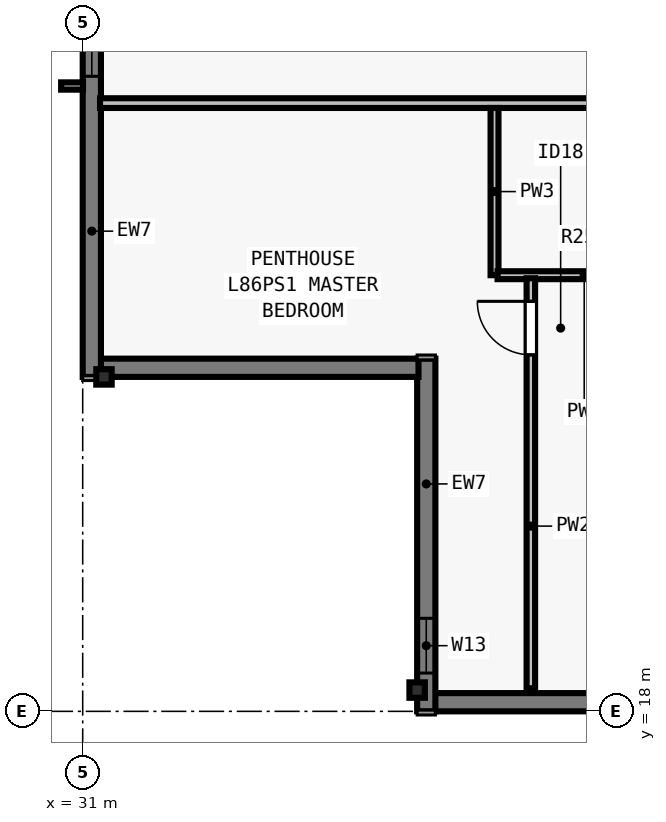
"""IFC4 building model, lengths in metres.
Left out: names, types, materials, properties, quantities, classifications, styles, units other than length and angle.
Written with IfcOpenShell. Run it as: python <this file> out.ifc"""

import sys

from ifc_helpers import new_model, si_unit, direction, frame, frame_2d, origin, origin_2d, place, context, subcontext, project, spatial, rectangle, i_section, extrude, element, fill, save


model = new_model("IFC4")
c1 = context("Model", 3, precision=1e-05, world=origin(), true_north=direction((0.0, 1.0)))
c2 = subcontext(c1, "Body", "Model", "MODEL_VIEW")
j1 = project(units=[si_unit("LENGTHUNIT", "METRE"), si_unit("PLANEANGLEUNIT", "RADIAN")], contexts=[c1])
p1 = place(None, origin())
s1 = spatial("IfcSite", under=j1, at=p1, CompositionType="ELEMENT")
p2 = place(p1, origin())
s2 = spatial("IfcBuilding", under=s1, at=p2, CompositionType="ELEMENT")
p3 = place(p2, frame((0.0, 0.0, 312.0)))
s3 = spatial("IfcBuildingStorey", under=s2, at=p3, CompositionType="ELEMENT", Elevation=312.0)
for number, where, z_axis, x_axis in (
    (1, (36.5, 18.35, 0.0), (0.0, 0.0, 1.0), (1.0, 0.0, 0.0)),
    (2, (31.35, 23.5, 0.0), (0.0, 0.0, 1.0), (0.0, 1.0, 0.0)),
):
    element("IfcColumn", number, at=place(p3, frame(where, z_axis=z_axis, x_axis=x_axis)), inside=s3, PredefinedType="COLUMN", context=c2, shape_type="SweptSolid", body=[
        extrude(i_section(OverallWidth=0.254, OverallDepth=0.254, WebThickness=0.009, FlangeThickness=0.014, FilletRadius=0.013, at=origin_2d()), origin(), (0.0, 0.0, 1.0), 3.5),
    ])
p4 = place(p3, frame((67.5, 18.15, 0.0), z_axis=(0.0, 0.0, 1.0), x_axis=(-1.0, 0.0, 0.0)))
e3 = element("IfcWall", 3, at=p4, inside=s3, PredefinedType="SOLIDWALL", context=c2, shape_type="SweptSolid", body=[
    extrude(rectangle(XDim=30.722, YDim=0.3, at=frame_2d((15.361, 0.0))), origin(), (0.0, 0.0, 1.0), 3.29),
])
p5 = place(p4, frame((4.944, 0.0, 0.8)))
e4 = element("IfcOpeningElement", 4, at=p5, cuts=e3, PredefinedType="OPENING", context=c2, shape_type="SweptSolid", body=[
    extrude(rectangle(XDim=1.65, YDim=1.758, at=frame_2d((0.825, 0.879))), frame((0.0, 0.16, 0.0), z_axis=(0.0, -1.0, 0.0), x_axis=(1.0, 0.0, 0.0)), (0.0, 0.0, 1.0), 0.32),
])
p6 = place(p4, frame((7.756, 0.0, 0.8)))
e5 = element("IfcOpeningElement", 5, at=p6, cuts=e3, PredefinedType="OPENING", context=c2, shape_type="SweptSolid", body=[
    extrude(rectangle(XDim=2.0, YDim=1.758, at=frame_2d((1.0, 0.879))), frame((0.0, 0.16, 0.0), z_axis=(0.0, -1.0, 0.0), x_axis=(1.0, 0.0, 0.0)), (0.0, 0.0, 1.0), 0.32),
])
p7 = place(p4, frame((12.617, 0.0, 0.8)))
e6 = element("IfcOpeningElement", 6, at=p7, cuts=e3, PredefinedType="OPENING", context=c2, shape_type="SweptSolid", body=[
    extrude(rectangle(XDim=1.65, YDim=1.758, at=frame_2d((0.825, 0.879))), frame((0.0, 0.16, 0.0), z_axis=(0.0, -1.0, 0.0), x_axis=(1.0, 0.0, 0.0)), (0.0, 0.0, 1.0), 0.32),
])
p8 = place(p4, frame((16.28, 0.0, 0.8)))
e7 = element("IfcOpeningElement", 7, at=p8, cuts=e3, PredefinedType="OPENING", context=c2, shape_type="SweptSolid", body=[
    extrude(rectangle(XDim=2.0, YDim=1.758, at=frame_2d((1.0, 0.879))), frame((0.0, 0.16, 0.0), z_axis=(0.0, -1.0, 0.0), x_axis=(1.0, 0.0, 0.0)), (0.0, 0.0, 1.0), 0.32),
])
p9 = place(p4, frame((21.142, 0.0, 0.8)))
e8 = element("IfcOpeningElement", 8, at=p9, cuts=e3, PredefinedType="OPENING", context=c2, shape_type="SweptSolid", body=[
    extrude(rectangle(XDim=1.65, YDim=1.758, at=frame_2d((0.825, 0.879))), frame((0.0, 0.16, 0.0), z_axis=(0.0, -1.0, 0.0), x_axis=(1.0, 0.0, 0.0)), (0.0, 0.0, 1.0), 0.32),
])
p10 = place(p4, frame((23.954, 0.0, 0.8)))
e9 = element("IfcOpeningElement", 9, at=p10, cuts=e3, PredefinedType="OPENING", context=c2, shape_type="SweptSolid", body=[
    extrude(rectangle(XDim=2.0, YDim=1.758, at=frame_2d((1.0, 0.879))), frame((0.0, 0.16, 0.0), z_axis=(0.0, -1.0, 0.0), x_axis=(1.0, 0.0, 0.0)), (0.0, 0.0, 1.0), 0.32),
])
p11 = place(p3, frame((36.65, 18.0, 0.0), z_axis=(0.0, 0.0, 1.0), x_axis=(0.0, 1.0, 0.0)))
e10 = element("IfcWall", 10, at=p11, inside=s3, PredefinedType="SOLIDWALL", context=c2, shape_type="SweptSolid", body=[
    extrude(rectangle(XDim=5.8, YDim=0.3, at=frame_2d((2.9, 0.0))), origin(), (0.0, 0.0, 1.0), 3.29),
])
p12 = place(p11, frame((0.63, 0.0, 0.8)))
e11 = element("IfcOpeningElement", 11, at=p12, cuts=e10, PredefinedType="OPENING", context=c2, shape_type="SweptSolid", body=[
    extrude(rectangle(XDim=0.9, YDim=1.75, at=frame_2d((0.45, 0.875))), frame((0.0, 0.16, 0.0), z_axis=(0.0, -1.0, 0.0), x_axis=(1.0, 0.0, 0.0)), (0.0, 0.0, 1.0), 0.32),
])
p13 = place(p3, frame((36.522, 23.65, 0.0), z_axis=(0.0, 0.0, 1.0), x_axis=(-1.0, 0.0, 0.0)))
e12 = element("IfcWall", 12, at=p13, inside=s3, PredefinedType="SOLIDWALL", context=c2, shape_type="SweptSolid", body=[
    extrude(rectangle(XDim=5.244, YDim=0.3, at=frame_2d((2.622, 0.0))), origin(), (0.0, 0.0, 1.0), 3.29),
])
p14 = place(p3, frame((31.15, 23.5, 0.0), z_axis=(0.0, 0.0, 1.0), x_axis=(0.0, 1.0, 0.0)))
e13 = element("IfcWall", 13, at=p14, inside=s3, PredefinedType="SOLIDWALL", context=c2, shape_type="SweptSolid", body=[
    extrude(rectangle(XDim=30.722, YDim=0.3, at=frame_2d((15.361, 0.0))), origin(), (0.0, 0.0, 1.0), 3.29),
])
p15 = place(p14, frame((4.944, 0.0, 0.8)))
e14 = element("IfcOpeningElement", 14, at=p15, cuts=e13, PredefinedType="OPENING", context=c2, shape_type="SweptSolid", body=[
    extrude(rectangle(XDim=1.65, YDim=1.758, at=frame_2d((0.825, 0.879))), frame((0.0, 0.16, 0.0), z_axis=(0.0, -1.0, 0.0), x_axis=(1.0, 0.0, 0.0)), (0.0, 0.0, 1.0), 0.32),
])
p16 = place(p14, frame((7.756, 0.0, 0.8)))
e15 = element("IfcOpeningElement", 15, at=p16, cuts=e13, PredefinedType="OPENING", context=c2, shape_type="SweptSolid", body=[
    extrude(rectangle(XDim=2.0, YDim=1.758, at=frame_2d((1.0, 0.879))), frame((0.0, 0.16, 0.0), z_axis=(0.0, -1.0, 0.0), x_axis=(1.0, 0.0, 0.0)), (0.0, 0.0, 1.0), 0.32),
])
p17 = place(p14, frame((12.617, 0.0, 0.8)))
e16 = element("IfcOpeningElement", 16, at=p17, cuts=e13, PredefinedType="OPENING", context=c2, shape_type="SweptSolid", body=[
    extrude(rectangle(XDim=1.65, YDim=1.758, at=frame_2d((0.825, 0.879))), frame((0.0, 0.16, 0.0), z_axis=(0.0, -1.0, 0.0), x_axis=(1.0, 0.0, 0.0)), (0.0, 0.0, 1.0), 0.32),
])
p18 = place(p14, frame((17.53, 0.0, 0.8)))
e17 = element("IfcOpeningElement", 17, at=p18, cuts=e13, PredefinedType="OPENING", context=c2, shape_type="SweptSolid", body=[
    extrude(rectangle(XDim=2.0, YDim=1.758, at=frame_2d((1.0, 0.879))), frame((0.0, 0.16, 0.0), z_axis=(0.0, -1.0, 0.0), x_axis=(1.0, 0.0, 0.0)), (0.0, 0.0, 1.0), 0.32),
])
p19 = place(p14, frame((21.142, 0.0, 0.8)))
e18 = element("IfcOpeningElement", 18, at=p19, cuts=e13, PredefinedType="OPENING", context=c2, shape_type="SweptSolid", body=[
    extrude(rectangle(XDim=1.65, YDim=1.758, at=frame_2d((0.825, 0.879))), frame((0.0, 0.16, 0.0), z_axis=(0.0, -1.0, 0.0), x_axis=(1.0, 0.0, 0.0)), (0.0, 0.0, 1.0), 0.32),
])
p20 = place(p14, frame((26.87, 0.0, 0.8)))
e19 = element("IfcOpeningElement", 19, at=p20, cuts=e13, PredefinedType="OPENING", context=c2, shape_type="SweptSolid", body=[
    extrude(rectangle(XDim=0.9, YDim=1.75, at=frame_2d((0.45, 0.875))), frame((0.0, 0.16, 0.0), z_axis=(0.0, -1.0, 0.0), x_axis=(1.0, 0.0, 0.0)), (0.0, 0.0, 1.0), 0.32),
])
p21 = place(p3, frame((31.285, 28.002, 0.0), z_axis=(0.0, 0.0, 1.0), x_axis=(1.0, 0.0, 0.0)))
e20 = element("IfcWall", 20, at=p21, inside=s3, PredefinedType="PARTITIONING", context=c2, shape_type="SweptSolid", body=[
    extrude(rectangle(XDim=41.43, YDim=0.16, at=frame_2d((20.715, 0.0))), origin(), (0.0, 0.0, 1.0), 3.009),
])
p22 = place(p21, frame((10.107, 0.0, 0.0)))
e21 = element("IfcOpeningElement", 21, at=p22, cuts=e20, PredefinedType="OPENING", context=c2, shape_type="SweptSolid", body=[
    extrude(rectangle(XDim=0.96, YDim=2.18, at=frame_2d((0.48, 1.09))), frame((0.0, 0.09, 0.0), z_axis=(0.0, -1.0, 0.0), x_axis=(1.0, 0.0, 0.0)), (0.0, 0.0, 1.0), 0.18),
])
p23 = place(p21, frame((30.688, 0.0, 0.0)))
e22 = element("IfcOpeningElement", 22, at=p23, cuts=e20, PredefinedType="OPENING", context=c2, shape_type="SweptSolid", body=[
    extrude(rectangle(XDim=0.96, YDim=2.18, at=frame_2d((0.48, 1.09))), frame((0.0, 0.09, 0.0), z_axis=(0.0, -1.0, 0.0), x_axis=(1.0, 0.0, 0.0)), (0.0, 0.0, 1.0), 0.18),
])
p24 = place(p3, frame((37.772, 25.173, 0.0), z_axis=(0.0, 0.0, 1.0), x_axis=(0.0, 1.0, 0.0)))
e23 = element("IfcWall", 23, at=p24, inside=s3, PredefinedType="PLUMBINGWALL", context=c2, shape_type="SweptSolid", body=[
    extrude(rectangle(XDim=2.75, YDim=0.13, at=frame_2d((1.375, 0.0))), origin(), (0.0, 0.0, 1.0), 3.29),
])
p25 = place(p3, frame((37.823, 25.173, 0.0), z_axis=(0.0, 0.0, 1.0), x_axis=(1.0, 0.0, 0.0)))
e24 = element("IfcWall", 24, at=p25, inside=s3, PredefinedType="PLUMBINGWALL", context=c2, shape_type="SweptSolid", body=[
    extrude(rectangle(XDim=2.85, YDim=0.13, at=frame_2d((1.425, 0.0))), origin(), (0.0, 0.0, 1.0), 3.29),
])
p26 = place(p3, frame((38.37, 18.38, 0.0), z_axis=(0.0, 0.0, 1.0), x_axis=(0.0, 1.0, 0.0)))
e25 = element("IfcWall", 25, at=p26, inside=s3, PredefinedType="PARTITIONING", context=c2, shape_type="SweptSolid", body=[
    extrude(rectangle(XDim=6.743, YDim=0.14, at=frame_2d((3.371, 0.0))), origin(), (0.0, 0.0, 1.0), 2.653),
])
p27 = place(p26, frame((5.482, 0.0, 0.0)))
e26 = element("IfcOpeningElement", 26, at=p27, cuts=e25, PredefinedType="OPENING", context=c2, shape_type="SweptSolid", body=[
    extrude(rectangle(XDim=0.88, YDim=2.1, at=frame_2d((0.44, 1.05))), frame((0.0, 0.08, 0.0), z_axis=(0.0, -1.0, 0.0), x_axis=(1.0, 0.0, 0.0)), (0.0, 0.0, 1.0), 0.16),
])
p28 = place(p15, origin())
e27 = element("IfcWindow", 27, at=p28, inside=s3, PartitioningType="SINGLE_PANEL", PredefinedType="WINDOW", context=c2, shape_type="SweptSolid", body=[
    extrude(rectangle(XDim=1.65, YDim=1.758, at=frame_2d((0.825, 0.879))), frame((0.0, -0.05, 0.0), z_axis=(0.0, -1.0, 0.0), x_axis=(1.0, 0.0, 0.0)), (0.0, 0.0, 1.0), 0.06),
])
fill(e14, e27)
p29 = place(p12, origin())
e28 = element("IfcWindow", 28, at=p29, inside=s3, PartitioningType="SINGLE_PANEL", PredefinedType="WINDOW", context=c2, shape_type="SweptSolid", body=[
    extrude(rectangle(XDim=0.9, YDim=1.75, at=frame_2d((0.45, 0.875))), frame((0.0, -0.04, 0.0), z_axis=(0.0, -1.0, 0.0), x_axis=(1.0, 0.0, 0.0)), (0.0, 0.0, 1.0), 0.06),
])
fill(e11, e28)
p30 = place(p27, origin())
e29 = element("IfcDoor", 29, at=p30, inside=s3, OperationType="SINGLE_SWING_RIGHT", PredefinedType="DOOR", context=c2, shape_type="SweptSolid", body=[
    extrude(rectangle(XDim=0.88, YDim=2.1, at=frame_2d((0.44, 1.05))), frame((0.0, 0.025, 0.0), z_axis=(0.0, -1.0, 0.0), x_axis=(1.0, 0.0, 0.0)), (0.0, 0.0, 1.0), 0.05),
])
fill(e26, e29)
save(model, sys.argv[1])
